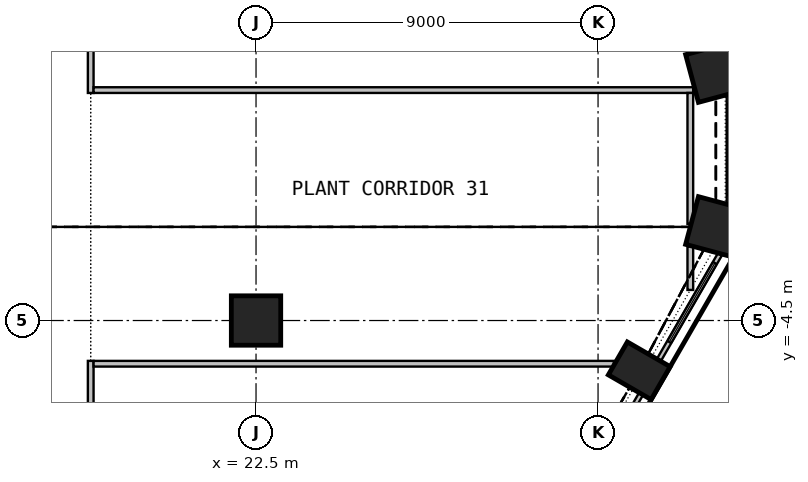
"""IFC4 building model, lengths in metres.
Left out: names, types, materials, properties, quantities, classifications, styles, units other than length and angle.
Written with IfcOpenShell. Run it as: python <this file> out.ifc"""

import sys

from ifc_helpers import new_model, si_unit, direction, frame, frame_2d, origin, origin_2d, place, context, subcontext, project, spatial, rectangle, circle, extrude, element, fill, save


model = new_model("IFC4")
c1 = context("Model", 3, precision=1e-05, world=origin(), true_north=direction((0.0, 1.0)))
c2 = subcontext(c1, "Body", "Model", "MODEL_VIEW")
j1 = project(units=[si_unit("LENGTHUNIT", "METRE"), si_unit("PLANEANGLEUNIT", "RADIAN")], contexts=[c1])
p1 = place(None, origin())
s1 = spatial("IfcSite", under=j1, at=p1, CompositionType="ELEMENT")
p2 = place(p1, origin())
s2 = spatial("IfcBuilding", under=s1, at=p2, CompositionType="ELEMENT")
p3 = place(p2, frame((0.0, 0.0, 128.1)))
s3 = spatial("IfcBuildingStorey", under=s2, at=p3, CompositionType="ELEMENT", Elevation=128.1)
p4 = place(p3, frame((32.584, -5.822, 0.0), z_axis=(0.0, 0.0, 1.0), x_axis=(0.5, 0.866025403784, 0.0)))
e1 = element("IfcColumn", 1, at=p4, inside=s3, PredefinedType="COLUMN", context=c2, shape_type="SweptSolid", body=[
    extrude(rectangle(XDim=1.0, YDim=1.3, at=origin_2d()), origin(), (0.0, 0.0, 1.0), 4.175),
])
for number, where, z_axis, x_axis in (
    (2, (34.601, -2.037, 0.0), (0.0, 0.0, 1.0), (0.259, 0.966, 0.0)),
    (3, (34.601, 2.037, 0.0), (0.0, 0.0, 1.0), (-0.259, 0.966, 0.0)),
):
    element("IfcColumn", number, at=place(p3, frame(where, z_axis=z_axis, x_axis=x_axis)), inside=s3, PredefinedType="COLUMN", context=c2, shape_type="SweptSolid", body=[
        extrude(rectangle(XDim=1.3, YDim=1.3, at=origin_2d()), origin(), (0.0, 0.0, 1.0), 4.175),
    ])
p5 = place(p3, frame((22.5, -4.5, 0.0), z_axis=(0.0, 0.0, 1.0), x_axis=(1.0, 0.0, 0.0)))
e4 = element("IfcColumn", 4, at=p5, inside=s3, PredefinedType="COLUMN", context=c2, shape_type="SweptSolid", body=[
    extrude(circle(Radius=0.65, at=origin_2d()), origin(), (0.0, 0.0, 1.0), 4.175),
])
p6 = place(p3, frame((30.883, -9.458, 0.0), z_axis=(0.0, 0.0, 1.0), x_axis=(0.499996256241, 0.866027565234, 0.0)))
e5 = element("IfcWall", 5, at=p6, inside=s3, PredefinedType="SOLIDWALL", context=c2, shape_type="SweptSolid", body=[
    extrude(rectangle(XDim=3.499, YDim=0.12, at=frame_2d((1.75, 0.0))), origin(), (0.0, 0.0, 1.0), 4.175),
])
p7 = place(p6, frame((0.55, 0.0, 0.6)))
e6 = element("IfcOpeningElement", 6, at=p7, cuts=e5, PredefinedType="OPENING", context=c2, shape_type="SweptSolid", body=[
    extrude(rectangle(XDim=2.4, YDim=3.0, at=frame_2d((1.2, 1.5))), frame((0.0, 0.07, 0.0), z_axis=(0.0, -1.0, 0.0), x_axis=(1.0, 0.0, 0.0)), (0.0, 0.0, 1.0), 0.14),
])
p8 = place(p3, frame((33.1, -5.542, 0.0), z_axis=(0.0, 0.0, 1.0), x_axis=(0.499974205047, 0.866040295995, 0.0)))
e7 = element("IfcWall", 7, at=p8, inside=s3, PredefinedType="SOLIDWALL", context=c2, shape_type="SweptSolid", body=[
    extrude(rectangle(XDim=3.218, YDim=0.12, at=frame_2d((1.609, 0.0))), origin(), (0.0, 0.0, 1.0), 4.175),
])
p9 = place(p8, frame((0.55, 0.0, 0.6)))
e8 = element("IfcOpeningElement", 8, at=p9, cuts=e7, PredefinedType="OPENING", context=c2, shape_type="SweptSolid", body=[
    extrude(rectangle(XDim=2.4, YDim=3.0, at=frame_2d((1.2, 1.5))), frame((0.0, 0.07, 0.0), z_axis=(0.0, -1.0, 0.0), x_axis=(1.0, 0.0, 0.0)), (0.0, 0.0, 1.0), 0.14),
])
p10 = place(p3, frame((34.946, -1.44, 0.0), z_axis=(0.0, 0.0, 1.0), x_axis=(0.0, 1.0, 0.0)))
e9 = element("IfcWall", 9, at=p10, inside=s3, PredefinedType="SOLIDWALL", context=c2, shape_type="SweptSolid", body=[
    extrude(rectangle(XDim=2.88, YDim=0.12, at=frame_2d((1.44, 0.0))), origin(), (0.0, 0.0, 1.0), 4.175),
])
p11 = place(p10, frame((0.24, 0.0, 0.6)))
e10 = element("IfcOpeningElement", 10, at=p11, cuts=e9, PredefinedType="OPENING", context=c2, shape_type="SweptSolid", body=[
    extrude(rectangle(XDim=2.4, YDim=3.0, at=frame_2d((1.2, 1.5))), frame((0.0, 0.07, 0.0), z_axis=(0.0, -1.0, 0.0), x_axis=(1.0, 0.0, 0.0)), (0.0, 0.0, 1.0), 0.14),
])
p12 = place(p3, frame((18.15, -15.825, 0.0), z_axis=(0.0, 0.0, 1.0), x_axis=(0.0, 1.0, 0.0)))
e11 = element("IfcWall", 11, at=p12, inside=s3, PredefinedType="PARTITIONING", context=c2, shape_type="SweptSolid", body=[
    extrude(rectangle(XDim=10.263, YDim=0.15, at=frame_2d((5.131, 0.0))), origin(), (0.0, 0.0, 1.0), 4.175),
])
p13 = place(p3, frame((31.917, -5.637, 0.0), z_axis=(0.0, 0.0, 1.0), x_axis=(-1.0, 0.0, 0.0)))
e12 = element("IfcWall", 12, at=p13, inside=s3, PredefinedType="PARTITIONING", context=c2, shape_type="SweptSolid", body=[
    extrude(rectangle(XDim=13.692, YDim=0.15, at=frame_2d((6.846, 0.0))), origin(), (0.0, 0.0, 1.0), 4.175),
])
p14 = place(p3, frame((18.15, 1.488, 0.0), z_axis=(0.0, 0.0, 1.0), x_axis=(0.0, 1.0, 0.0)))
e13 = element("IfcWall", 13, at=p14, inside=s3, PredefinedType="PARTITIONING", context=c2, shape_type="SweptSolid", body=[
    extrude(rectangle(XDim=14.337, YDim=0.15, at=frame_2d((7.168, 0.0))), origin(), (0.0, 0.0, 1.0), 4.175),
])
p15 = place(p3, frame((18.225, 1.563, 0.0), z_axis=(0.0, 0.0, 1.0), x_axis=(1.0, 0.0, 0.0)))
e14 = element("IfcWall", 14, at=p15, inside=s3, PredefinedType="PARTITIONING", context=c2, shape_type="SweptSolid", body=[
    extrude(rectangle(XDim=15.778, YDim=0.15, at=frame_2d((7.889, 0.0))), origin(), (0.0, 0.0, 1.0), 4.175),
])
p16 = place(p3, frame((33.928, 1.488, 0.0), z_axis=(0.0, 0.0, 1.0), x_axis=(0.0, -1.0, 0.0)))
e15 = element("IfcWall", 15, at=p16, inside=s3, PredefinedType="PARTITIONING", context=c2, shape_type="SweptSolid", body=[
    extrude(rectangle(XDim=3.448, YDim=0.15, at=frame_2d((1.724, 0.0))), origin(), (0.0, 0.0, 1.0), 4.175),
])
p17 = place(p3, frame((33.928, -2.55, 0.0), z_axis=(0.0, 0.0, 1.0), x_axis=(0.0, -1.0, 0.0)))
e16 = element("IfcWall", 16, at=p17, inside=s3, PredefinedType="PARTITIONING", context=c2, shape_type="SweptSolid", body=[
    extrude(rectangle(XDim=1.145, YDim=0.15, at=frame_2d((0.573, 0.0))), origin(), (0.0, 0.0, 1.0), 4.175),
])
p18 = place(p9, origin())
e17 = element("IfcWindow", 17, at=p18, inside=s3, PartitioningType="SINGLE_PANEL", PredefinedType="WINDOW", context=c2, shape_type="SweptSolid", body=[
    extrude(rectangle(XDim=2.4, YDim=3.0, at=frame_2d((1.2, 1.5))), frame((0.0, 0.06, 0.0), z_axis=(0.0, -1.0, 0.0), x_axis=(1.0, 0.0, 0.0)), (0.0, 0.0, 1.0), 0.02),
])
fill(e8, e17)
p19 = place(p11, origin())
e18 = element("IfcWindow", 18, at=p19, inside=s3, PartitioningType="SINGLE_PANEL", PredefinedType="WINDOW", context=c2, shape_type="SweptSolid", body=[
    extrude(rectangle(XDim=2.4, YDim=3.0, at=frame_2d((1.2, 1.5))), frame((0.0, 0.06, 0.0), z_axis=(0.0, -1.0, 0.0), x_axis=(1.0, 0.0, 0.0)), (0.0, 0.0, 1.0), 0.02),
])
fill(e10, e18)
save(model, sys.argv[1])
